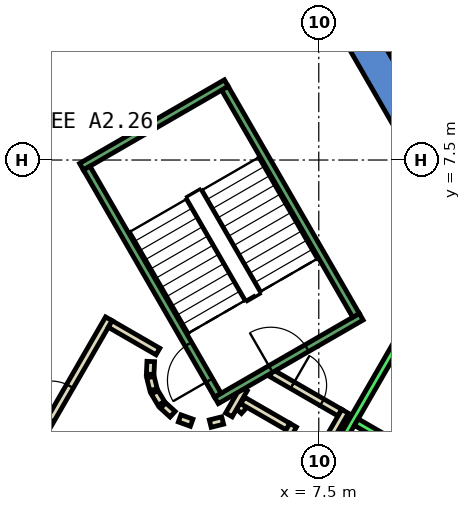
"""IFC4 building model, lengths in metres.
Left out: names, types, materials, properties, quantities, classifications, styles, units other than length and angle.
Written with IfcOpenShell. Run it as: python <this file> out.ifc"""

import sys

from ifc_helpers import new_model, si_unit, direction, frame, frame_2d, origin, place, context, subcontext, project, spatial, polyline, rectangle, outline, extrude, element, fill, save


model = new_model("IFC4")
c1 = context("Model", 3, precision=1e-05, world=origin(), true_north=direction((0.0, 1.0)))
c2 = subcontext(c1, "Body", "Model", "MODEL_VIEW")
j1 = project(units=[si_unit("LENGTHUNIT", "METRE"), si_unit("PLANEANGLEUNIT", "RADIAN")], contexts=[c1])
p1 = place(None, origin())
s1 = spatial("IfcSite", under=j1, at=p1, CompositionType="ELEMENT")
p2 = place(p1, origin())
s2 = spatial("IfcBuilding", under=s1, at=p2, CompositionType="ELEMENT")
p3 = place(p2, frame((0.0, 0.0, 128.6)))
s3 = spatial("IfcBuildingStorey", under=s2, at=p3, CompositionType="ELEMENT", Elevation=128.6)
p4 = place(p3, frame((0.0, 0.0, -0.4)))
e1 = element("IfcWall", 1, at=p4, inside=s3, PredefinedType="SHEAR", context=c2, shape_type="SweptSolid", body=[
    extrude(outline(polyline([(8.517, 11.748), (7.781, 11.323), (12.875, 2.5), (13.856, 2.5), (8.517, 11.748)])), origin(), (0.0, 0.0, 1.0), 4.0),
])
p5 = place(p3, frame((5.39, 0.898, 0.0), z_axis=(0.0, 0.0, 1.0), x_axis=(0.673828488714, 0.738887791073, 0.0)))
e2 = element("IfcWall", 2, at=p5, inside=s3, PredefinedType="PARTITIONING", context=c2, shape_type="SweptSolid", body=[
    extrude(rectangle(XDim=0.263, YDim=0.2, at=frame_2d((0.131, 0.0))), origin(), (0.0, 0.0, 1.0), 3.6),
])
p6 = place(p3, frame((5.499, 1.172, 0.0), z_axis=(0.0, 0.0, 1.0), x_axis=(0.866333505267, -0.499465972466, 0.0)))
e3 = element("IfcWall", 3, at=p6, inside=s3, PredefinedType="PARTITIONING", context=c2, shape_type="SweptSolid", body=[
    extrude(rectangle(XDim=1.374, YDim=0.2, at=frame_2d((0.687, 0.0))), origin(), (0.0, 0.0, 1.0), 3.6),
])
p7 = place(p3, frame((6.826, 0.522, 0.0), z_axis=(0.0, 0.0, 1.0), x_axis=(-0.500016722714, -0.866015748706, 0.0)))
e4 = element("IfcWall", 4, at=p7, inside=s3, PredefinedType="PARTITIONING", context=c2, shape_type="SweptSolid", body=[
    extrude(rectangle(XDim=1.7, YDim=0.2, at=frame_2d((0.85, 0.0))), origin(), (0.0, 0.0, 1.0), 3.6),
])
p8 = place(p3, frame((6.25, 1.894, 0.0), z_axis=(0.0, 0.0, 1.0), x_axis=(0.866043184279, -0.499969202016, 0.0)))
e5 = element("IfcWall", 5, at=p8, inside=s3, PredefinedType="PARTITIONING", context=c2, shape_type="SweptSolid", body=[
    extrude(rectangle(XDim=2.084, YDim=0.2, at=frame_2d((1.042, 0.0))), origin(), (0.0, 0.0, 1.0), 3.6),
])
p9 = place(p8, frame((0.642, 0.0, 0.0)))
e6 = element("IfcOpeningElement", 6, at=p9, cuts=e5, PredefinedType="OPENING", context=c2, shape_type="SweptSolid", body=[
    extrude(rectangle(XDim=0.9, YDim=2.1, at=frame_2d((0.45, 1.05))), frame((0.0, 0.11, 0.0), z_axis=(0.0, -1.0, 0.0), x_axis=(1.0, 0.0, 0.0)), (0.0, 0.0, 1.0), 0.22),
])
p10 = place(p3, frame((8.192, 0.888, 0.0), z_axis=(0.0, 0.0, 1.0), x_axis=(-0.499940625693, -0.866059680843, 0.0)))
e7 = element("IfcWall", 7, at=p10, inside=s3, PredefinedType="PARTITIONING", context=c2, shape_type="SweptSolid", body=[
    extrude(rectangle(XDim=2.68, YDim=0.2, at=frame_2d((1.34, 0.0))), origin(), (0.0, 0.0, 1.0), 3.6),
])
p11 = place(p3, frame((5.135, 0.793, 0.0), z_axis=(0.0, 0.0, 1.0), x_axis=(0.499526442893, 0.866298639529, 0.0)))
e8 = element("IfcWall", 8, at=p11, inside=s3, PredefinedType="PARTITIONING", context=c2, shape_type="SweptSolid", body=[
    extrude(rectangle(XDim=0.791, YDim=0.2, at=frame_2d((0.396, 0.0))), origin(), (0.0, 0.0, 1.0), 3.6),
])
p12 = place(p3, frame((-0.52, -1.0, 0.0), z_axis=(0.0, 0.0, 1.0), x_axis=(0.50011622646, 0.865958290007, 0.0)))
e9 = element("IfcWall", 9, at=p12, inside=s3, PredefinedType="PARTITIONING", context=c2, shape_type="SweptSolid", body=[
    extrude(rectangle(XDim=4.991, YDim=0.2, at=frame_2d((2.496, 0.0))), origin(), (0.0, 0.0, 1.0), 3.6),
])
p13 = place(p12, frame((1.945, 0.0, 0.0)))
e10 = element("IfcOpeningElement", 10, at=p13, cuts=e9, PredefinedType="OPENING", context=c2, shape_type="SweptSolid", body=[
    extrude(rectangle(XDim=1.0, YDim=2.1, at=frame_2d((0.5, 1.05))), frame((0.0, 0.11, 0.0), z_axis=(0.0, -1.0, 0.0), x_axis=(1.0, 0.0, 0.0)), (0.0, 0.0, 1.0), 0.22),
])
p14 = place(p3, frame((2.012, 3.186, 0.0), z_axis=(0.0, 0.0, 1.0), x_axis=(0.865891012941, -0.500232699559, 0.0)))
e11 = element("IfcWall", 11, at=p14, inside=s3, PredefinedType="PARTITIONING", context=c2, shape_type="SweptSolid", body=[
    extrude(rectangle(XDim=1.449, YDim=0.2, at=frame_2d((0.725, 0.0))), origin(), (0.0, 0.0, 1.0), 3.6),
])
p15 = place(p3, frame((3.079, 2.199, 0.0), z_axis=(0.0, 0.0, 1.0), x_axis=(-0.047771483479, -0.998858290933, 0.0)))
e12 = element("IfcWall", 12, at=p15, inside=s3, PredefinedType="PARTITIONING", context=c2, shape_type="SweptSolid", body=[
    extrude(rectangle(XDim=0.337, YDim=0.2, at=frame_2d((0.169, 0.0))), origin(), (0.0, 0.0, 1.0), 3.6),
])
p16 = place(p3, frame((3.07, 1.786, 0.0), z_axis=(0.0, 0.0, 1.0), x_axis=(0.242705583207, -0.970099994784, 0.0)))
e13 = element("IfcWall", 13, at=p16, inside=s3, PredefinedType="PARTITIONING", context=c2, shape_type="SweptSolid", body=[
    extrude(rectangle(XDim=0.338, YDim=0.2, at=frame_2d((0.169, 0.0))), origin(), (0.0, 0.0, 1.0), 3.6),
])
for number, where, z_axis, x_axis in (
    (14, (3.182, 1.388, 0.0), (0.0, 0.0, 1.0), (0.512, -0.859, 0.0)),
    (15, (3.404, 1.039, 0.0), (0.0, 0.0, 1.0), (0.74, -0.672, 0.0)),
):
    element("IfcWall", number, at=place(p3, frame(where, z_axis=z_axis, x_axis=x_axis)), inside=s3, PredefinedType="PARTITIONING", context=c2, shape_type="SweptSolid", body=[
        extrude(rectangle(XDim=0.338, YDim=0.2, at=frame_2d((0.169, 0.0))), origin(), (0.0, 0.0, 1.0), 3.6),
    ])
p17 = place(p3, frame((3.838, 0.702, 0.0), z_axis=(0.0, 0.0, 1.0), x_axis=(0.941035081519, -0.338308993895, 0.0)))
e16 = element("IfcWall", 16, at=p17, inside=s3, PredefinedType="PARTITIONING", context=c2, shape_type="SweptSolid", body=[
    extrude(rectangle(XDim=0.337, YDim=0.2, at=frame_2d((0.168, 0.0))), origin(), (0.0, 0.0, 1.0), 3.6),
])
p18 = place(p3, frame((4.644, 0.564, 0.0), z_axis=(0.0, 0.0, 1.0), x_axis=(0.969929076366, 0.243387729394, 0.0)))
e17 = element("IfcWall", 17, at=p18, inside=s3, PredefinedType="PARTITIONING", context=c2, shape_type="SweptSolid", body=[
    extrude(rectangle(XDim=0.337, YDim=0.2, at=frame_2d((0.168, 0.0))), origin(), (0.0, 0.0, 1.0), 3.6),
])
p19 = place(p3, frame((4.451, -6.19, 0.0), z_axis=(0.0, 0.0, 1.0), x_axis=(0.50000090737, 0.866024879913, 0.0)))
e18 = element("IfcWall", 18, at=p19, inside=s3, PredefinedType="STANDARD", context=c2, shape_type="SweptSolid", body=[
    extrude(rectangle(XDim=10.6, YDim=0.2, at=frame_2d((5.3, 0.0))), origin(), (0.0, 0.0, 1.0), 3.6),
])
p20 = place(p3, frame((8.488, 0.602, 0.0), z_axis=(0.0, 0.0, 1.0), x_axis=(0.866022959057, -0.500004234368, 0.0)))
e19 = element("IfcWall", 19, at=p20, inside=s3, PredefinedType="STANDARD", context=c2, shape_type="SweptSolid", body=[
    extrude(rectangle(XDim=2.5, YDim=0.2, at=frame_2d((1.25, 0.0))), origin(), (0.0, 0.0, 1.0), 3.6),
])
p21 = place(p3, frame((4.806, 1.176, 0.0), z_axis=(0.0, 0.0, 1.0), x_axis=(0.866059941101, 0.499940174841, 0.0)))
e20 = element("IfcWall", 20, at=p21, inside=s3, PredefinedType="STANDARD", context=c2, shape_type="SweptSolid", body=[
    extrude(rectangle(XDim=4.4, YDim=0.2, at=frame_2d((2.2, 0.0))), origin(), (0.0, 0.0, 1.0), 3.6),
])
p22 = place(p21, frame((1.65, 0.0, 0.0)))
e21 = element("IfcOpeningElement", 21, at=p22, cuts=e20, PredefinedType="OPENING", context=c2, shape_type="SweptSolid", body=[
    extrude(rectangle(XDim=1.1, YDim=2.2, at=frame_2d((0.55, 1.1))), frame((0.0, 0.11, 0.0), z_axis=(0.0, -1.0, 0.0), x_axis=(1.0, 0.0, 0.0)), (0.0, 0.0, 1.0), 0.22),
])
p23 = place(p3, frame((1.256, 7.324, 0.0), z_axis=(0.0, 0.0, 1.0), x_axis=(0.866046073146, 0.499964197906, 0.0)))
e22 = element("IfcWall", 22, at=p23, inside=s3, PredefinedType="STANDARD", context=c2, shape_type="SweptSolid", body=[
    extrude(rectangle(XDim=4.4, YDim=0.2, at=frame_2d((2.2, 0.0))), origin(), (0.0, 0.0, 1.0), 3.6),
])
p24 = place(p3, frame((4.843, 1.312, 0.0), z_axis=(0.0, 0.0, 1.0), x_axis=(-0.499963383562, 0.866046543262, 0.0)))
e23 = element("IfcWall", 23, at=p24, inside=s3, PredefinedType="STANDARD", context=c2, shape_type="SweptSolid", body=[
    extrude(rectangle(XDim=6.9, YDim=0.2, at=frame_2d((3.45, 0.0))), origin(), (0.0, 0.0, 1.0), 3.6),
])
p25 = place(p24, frame((0.45, 0.0, 0.0)))
e24 = element("IfcOpeningElement", 24, at=p25, cuts=e23, PredefinedType="OPENING", context=c2, shape_type="SweptSolid", body=[
    extrude(rectangle(XDim=1.1, YDim=2.2, at=frame_2d((0.55, 1.1))), frame((0.0, 0.11, 0.0), z_axis=(0.0, -1.0, 0.0), x_axis=(1.0, 0.0, 0.0)), (0.0, 0.0, 1.0), 0.22),
])
p26 = place(p3, frame((8.48, 3.412, 0.0), z_axis=(0.0, 0.0, 1.0), x_axis=(-0.499978703459, 0.866037698999, 0.0)))
e25 = element("IfcWall", 25, at=p26, inside=s3, PredefinedType="STANDARD", context=c2, shape_type="SweptSolid", body=[
    extrude(rectangle(XDim=6.9, YDim=0.2, at=frame_2d((3.45, 0.0))), origin(), (0.0, 0.0, 1.0), 3.6),
])
p27 = place(p13, origin())
e26 = element("IfcDoor", 26, at=p27, inside=s3, OperationType="SINGLE_SWING_LEFT", PredefinedType="DOOR", context=c2, shape_type="SweptSolid", body=[
    extrude(rectangle(XDim=1.0, YDim=2.1, at=frame_2d((0.5, 1.05))), frame((0.0, 0.025, 0.0), z_axis=(0.0, -1.0, 0.0), x_axis=(1.0, 0.0, 0.0)), (0.0, 0.0, 1.0), 0.05),
])
fill(e10, e26)
p28 = place(p9, origin())
e27 = element("IfcDoor", 27, at=p28, inside=s3, OperationType="SINGLE_SWING_LEFT", PredefinedType="DOOR", context=c2, shape_type="SweptSolid", body=[
    extrude(rectangle(XDim=0.9, YDim=2.1, at=frame_2d((0.45, 1.05))), frame((0.0, 0.025, 0.0), z_axis=(0.0, -1.0, 0.0), x_axis=(1.0, 0.0, 0.0)), (0.0, 0.0, 1.0), 0.05),
])
fill(e6, e27)
p29 = place(p25, origin())
e28 = element("IfcDoor", 28, at=p29, inside=s3, OperationType="SINGLE_SWING_LEFT", PredefinedType="DOOR", context=c2, shape_type="SweptSolid", body=[
    extrude(rectangle(XDim=1.1, YDim=2.2, at=frame_2d((0.55, 1.1))), frame((0.0, 0.025, 0.0), z_axis=(0.0, -1.0, 0.0), x_axis=(1.0, 0.0, 0.0)), (0.0, 0.0, 1.0), 0.05),
])
fill(e24, e28)
p30 = place(p22, origin())
e29 = element("IfcDoor", 29, at=p30, inside=s3, OperationType="SINGLE_SWING_LEFT", PredefinedType="DOOR", context=c2, shape_type="SweptSolid", body=[
    extrude(rectangle(XDim=1.1, YDim=2.2, at=frame_2d((0.55, 1.1))), frame((0.0, 0.025, 0.0), z_axis=(0.0, -1.0, 0.0), x_axis=(1.0, 0.0, 0.0)), (0.0, 0.0, 1.0), 0.05),
])
fill(e21, e29)
save(model, sys.argv[1])
